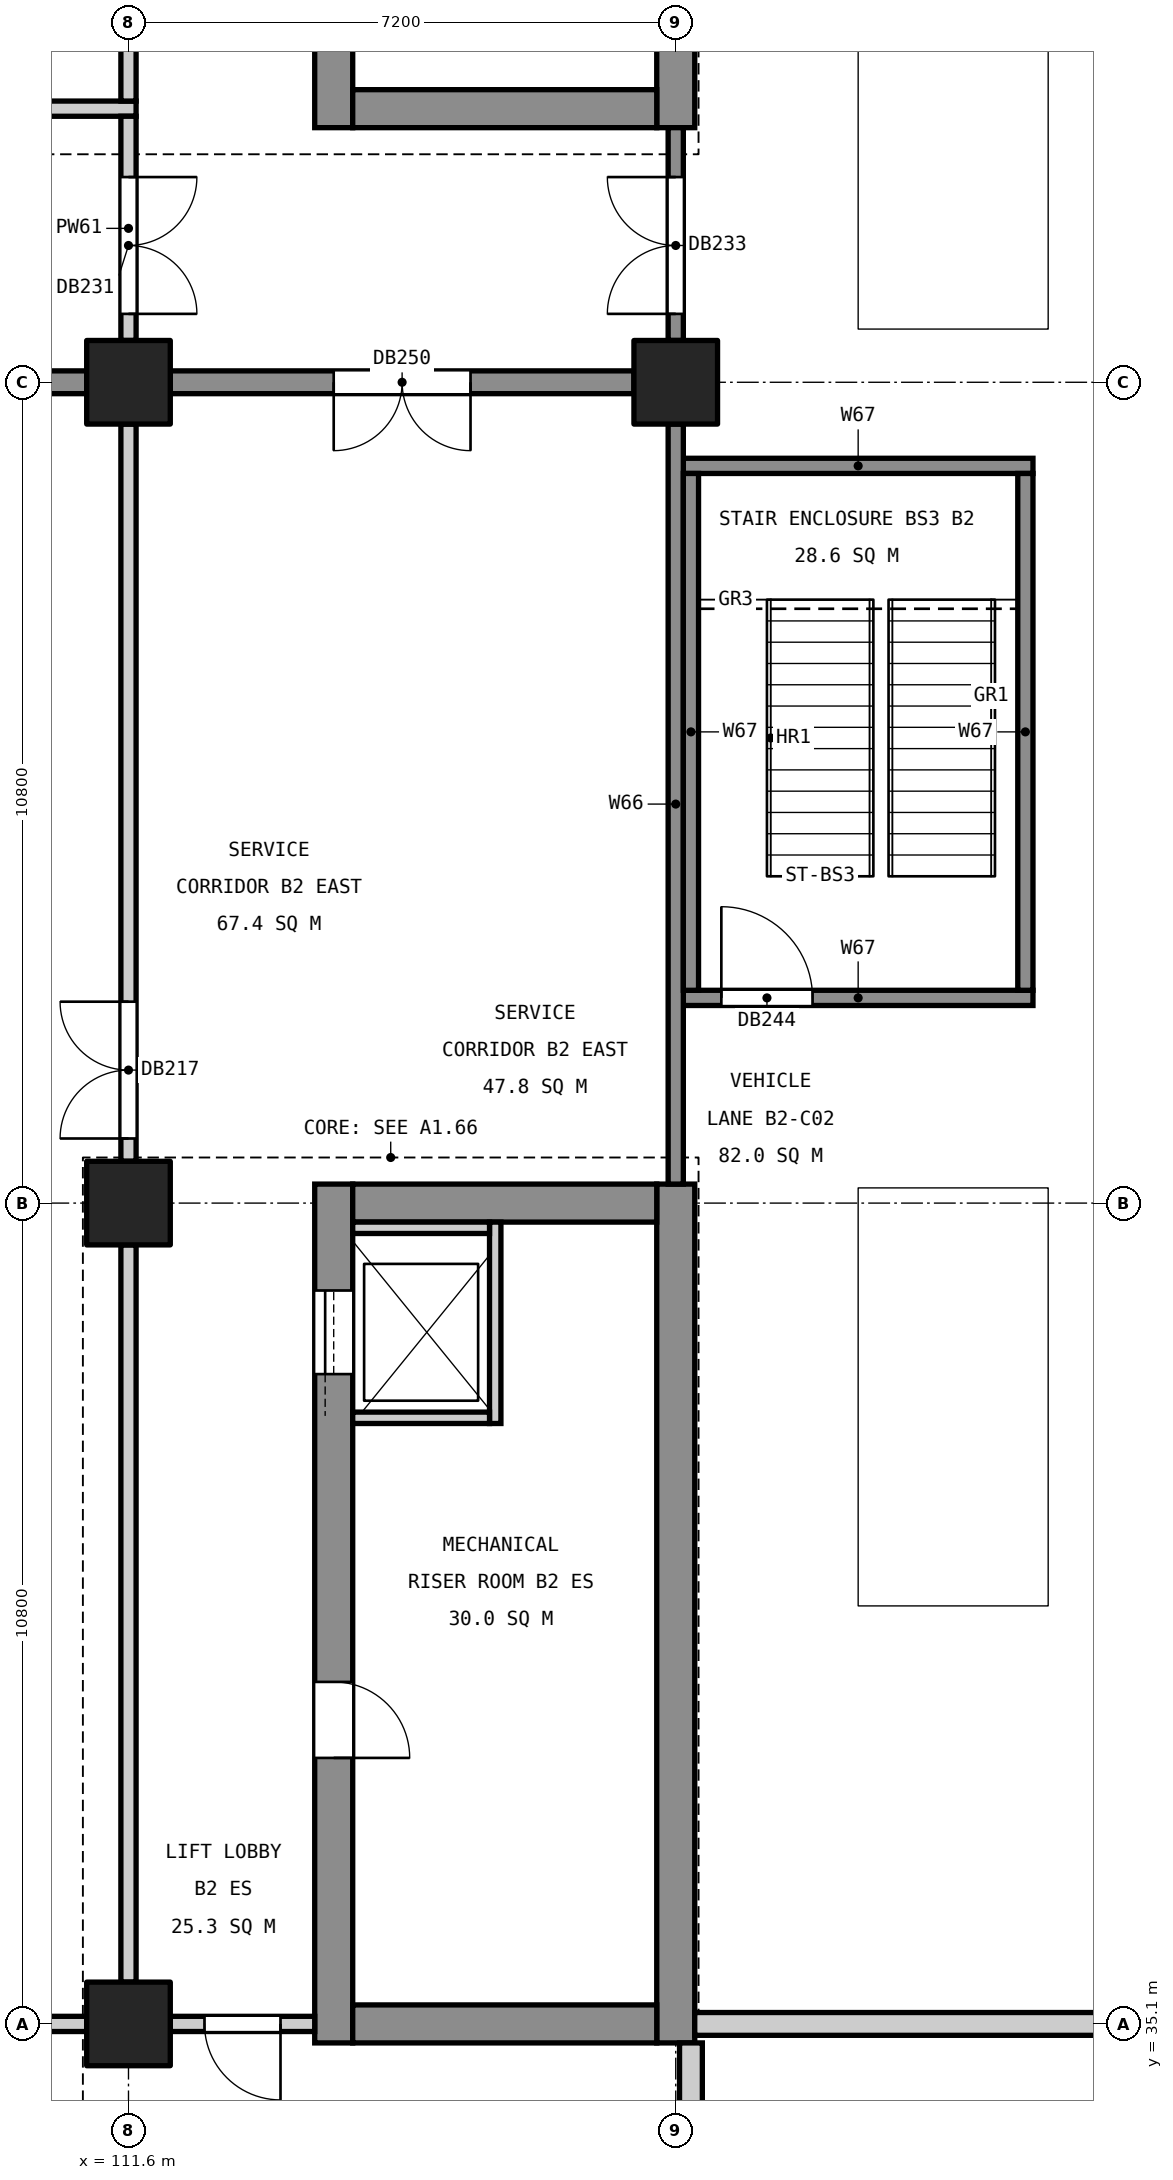
"""IFC4 building model, lengths in metres.
Left out: names, types, materials, properties, quantities, classifications, styles, units other than length and angle.
Written with IfcOpenShell. Run it as: python <this file> out.ifc"""

import sys

from ifc_helpers import new_model, si_unit, direction, frame, frame_2d, origin, origin_2d, place, context, subcontext, project, spatial, rectangle, extrude, element, fill, save


model = new_model("IFC4")
c1 = context("Model", 3, precision=1e-05, world=origin(), true_north=direction((0.0, 1.0)))
c2 = subcontext(c1, "Body", "Model", "MODEL_VIEW")
j1 = project(units=[si_unit("LENGTHUNIT", "METRE"), si_unit("PLANEANGLEUNIT", "RADIAN")], contexts=[c1])
p1 = place(None, origin())
s1 = spatial("IfcSite", under=j1, at=p1, CompositionType="ELEMENT")
p2 = place(p1, origin())
s2 = spatial("IfcBuilding", under=s1, at=p2, CompositionType="ELEMENT")
p3 = place(p2, frame((0.0, 0.0, -9.6)))
s3 = spatial("IfcBuildingStorey", under=s2, at=p3, CompositionType="ELEMENT", Elevation=-9.6)
for number, where, z_axis, x_axis in (
    (1, (118.8, 56.7, 0.0), (0.0, 0.0, 1.0), (1.0, 0.0, 0.0)),
    (2, (111.6, 35.1, 0.0), (0.0, 0.0, 1.0), (1.0, 0.0, 0.0)),
    (3, (111.6, 45.9, 0.0), (0.0, 0.0, 1.0), (1.0, 0.0, 0.0)),
    (4, (111.6, 56.7, 0.0), (0.0, 0.0, 1.0), (1.0, 0.0, 0.0)),
):
    element("IfcColumn", number, at=place(p3, frame(where, z_axis=z_axis, x_axis=x_axis)), inside=s3, PredefinedType="COLUMN", context=c2, shape_type="SweptSolid", body=[
        extrude(rectangle(XDim=1.1, YDim=1.1, at=origin_2d()), origin(), (0.0, 0.0, 1.0), 4.35),
    ])
p4 = place(p3, frame((118.8, 34.85, 0.0), z_axis=(0.0, 0.0, 1.0), x_axis=(0.0, 1.0, 0.0)))
e5 = element("IfcWall", 5, at=p4, inside=s3, PredefinedType="SHEAR", context=c2, shape_type="SweptSolid", body=[
    extrude(rectangle(XDim=11.3, YDim=0.5, at=frame_2d((5.65, 0.0))), origin(), (0.0, 0.0, 1.0), 4.35),
])
p5 = place(p3, frame((114.3, 34.85, 0.0), z_axis=(0.0, 0.0, 1.0), x_axis=(0.0, 1.0, 0.0)))
e6 = element("IfcWall", 6, at=p5, inside=s3, PredefinedType="SHEAR", context=c2, shape_type="SweptSolid", body=[
    extrude(rectangle(XDim=11.3, YDim=0.5, at=frame_2d((5.65, 0.0))), origin(), (0.0, 0.0, 1.0), 4.35),
])
p6 = place(p5, frame((8.8, 0.0, 0.0)))
e7 = element("IfcOpeningElement", 7, at=p6, cuts=e6, PredefinedType="OPENING", context=c2, shape_type="SweptSolid", body=[
    extrude(rectangle(XDim=1.1, YDim=2.1, at=frame_2d((0.55, 1.05))), frame((0.0, 0.26, 0.0), z_axis=(0.0, -1.0, 0.0), x_axis=(1.0, 0.0, 0.0)), (0.0, 0.0, 1.0), 0.52),
])
p7 = place(p5, frame((3.75, 0.0, 0.0)))
e8 = element("IfcOpeningElement", 8, at=p7, cuts=e6, PredefinedType="OPENING", context=c2, shape_type="SweptSolid", body=[
    extrude(rectangle(XDim=1.0, YDim=2.1, at=frame_2d((0.5, 1.05))), frame((0.0, 0.26, 0.0), z_axis=(0.0, -1.0, 0.0), x_axis=(1.0, 0.0, 0.0)), (0.0, 0.0, 1.0), 0.52),
])
for number, where, z_axis, x_axis in (
    (9, (118.55, 35.1, 0.0), (0.0, 0.0, 1.0), (-1.0, 0.0, 0.0)),
    (10, (118.55, 45.9, 0.0), (0.0, 0.0, 1.0), (-1.0, 0.0, 0.0)),
):
    element("IfcWall", number, at=place(p3, frame(where, z_axis=z_axis, x_axis=x_axis)), inside=s3, PredefinedType="SHEAR", context=c2, shape_type="SweptSolid", body=[
        extrude(rectangle(XDim=4.0, YDim=0.5, at=frame_2d((2.0, 0.0))), origin(), (0.0, 0.0, 1.0), 4.35),
    ])
p8 = place(p3, frame((118.8, 60.05, 0.0), z_axis=(0.0, 0.0, 1.0), x_axis=(0.0, 1.0, 0.0)))
e11 = element("IfcWall", 11, at=p8, inside=s3, PredefinedType="SHEAR", context=c2, shape_type="SweptSolid", body=[
    extrude(rectangle(XDim=14.9, YDim=0.5, at=frame_2d((7.45, 0.0))), origin(), (0.0, 0.0, 1.0), 4.35),
])
p9 = place(p3, frame((114.3, 60.05, 0.0), z_axis=(0.0, 0.0, 1.0), x_axis=(0.0, 1.0, 0.0)))
e12 = element("IfcWall", 12, at=p9, inside=s3, PredefinedType="SHEAR", context=c2, shape_type="SweptSolid", body=[
    extrude(rectangle(XDim=14.9, YDim=0.5, at=frame_2d((7.45, 0.0))), origin(), (0.0, 0.0, 1.0), 4.35),
])
p10 = place(p9, frame((8.85, 0.0, 0.0)))
e13 = element("IfcOpeningElement", 13, at=p10, cuts=e12, PredefinedType="OPENING", context=c2, shape_type="SweptSolid", body=[
    extrude(rectangle(XDim=1.1, YDim=2.1, at=frame_2d((0.55, 1.05))), frame((0.0, 0.26, 0.0), z_axis=(0.0, -1.0, 0.0), x_axis=(1.0, 0.0, 0.0)), (0.0, 0.0, 1.0), 0.52),
])
p11 = place(p9, frame((11.4, 0.0, 0.0)))
e14 = element("IfcOpeningElement", 14, at=p11, cuts=e12, PredefinedType="OPENING", context=c2, shape_type="SweptSolid", body=[
    extrude(rectangle(XDim=1.1, YDim=2.1, at=frame_2d((0.55, 1.05))), frame((0.0, 0.26, 0.0), z_axis=(0.0, -1.0, 0.0), x_axis=(1.0, 0.0, 0.0)), (0.0, 0.0, 1.0), 0.52),
])
p12 = place(p9, frame((3.75, 0.0, 0.0)))
e15 = element("IfcOpeningElement", 15, at=p12, cuts=e12, PredefinedType="OPENING", context=c2, shape_type="SweptSolid", body=[
    extrude(rectangle(XDim=1.0, YDim=2.1, at=frame_2d((0.5, 1.05))), frame((0.0, 0.26, 0.0), z_axis=(0.0, -1.0, 0.0), x_axis=(1.0, 0.0, 0.0)), (0.0, 0.0, 1.0), 0.52),
])
p13 = place(p3, frame((118.55, 60.3, 0.0), z_axis=(0.0, 0.0, 1.0), x_axis=(-1.0, 0.0, 0.0)))
e16 = element("IfcWall", 16, at=p13, inside=s3, PredefinedType="SHEAR", context=c2, shape_type="SweptSolid", body=[
    extrude(rectangle(XDim=4.0, YDim=0.5, at=frame_2d((2.0, 0.0))), origin(), (0.0, 0.0, 1.0), 4.35),
])
p14 = place(p3, frame((118.25, 56.7, 0.0), z_axis=(0.0, 0.0, 1.0), x_axis=(-1.0, 0.0, 0.0)))
e17 = element("IfcWall", 17, at=p14, inside=s3, PredefinedType="SHEAR", context=c2, shape_type="SweptSolid", body=[
    extrude(rectangle(XDim=6.1, YDim=0.3, at=frame_2d((3.05, 0.0))), origin(), (0.0, 0.0, 1.0), 4.35),
])
p15 = place(p14, frame((2.15, 0.0, 0.0)))
e18 = element("IfcOpeningElement", 18, at=p15, cuts=e17, PredefinedType="OPENING", context=c2, shape_type="SweptSolid", body=[
    extrude(rectangle(XDim=1.8, YDim=2.1, at=frame_2d((0.9, 1.05))), frame((0.0, 0.16, 0.0), z_axis=(0.0, -1.0, 0.0), x_axis=(1.0, 0.0, 0.0)), (0.0, 0.0, 1.0), 0.32),
])
p16 = place(p3, frame((111.05, 56.7, 0.0), z_axis=(0.0, 0.0, 1.0), x_axis=(-1.0, 0.0, 0.0)))
e19 = element("IfcWall", 19, at=p16, inside=s3, PredefinedType="SHEAR", context=c2, shape_type="SweptSolid", body=[
    extrude(rectangle(XDim=9.7, YDim=0.3, at=frame_2d((4.85, 0.0))), origin(), (0.0, 0.0, 1.0), 4.35),
])
p17 = place(p3, frame((116.425, 43.0, 0.0), z_axis=(0.0, 0.0, 1.0), x_axis=(0.0, 1.0, 0.0)))
e20 = element("IfcWall", 20, at=p17, inside=s3, PredefinedType="SOLIDWALL", context=c2, shape_type="SweptSolid", body=[
    extrude(rectangle(XDim=2.65, YDim=0.15, at=frame_2d((1.325, 0.0))), origin(), (0.0, 0.0, 1.0), 4.8),
])
for number, where, z_axis, x_axis in (
    (21, (116.35, 43.075, 0.0), (0.0, 0.0, 1.0), (-1.0, 0.0, 0.0)),
    (22, (116.35, 45.575, 0.0), (0.0, 0.0, 1.0), (-1.0, 0.0, 0.0)),
):
    element("IfcWall", number, at=place(p3, frame(where, z_axis=z_axis, x_axis=x_axis)), inside=s3, PredefinedType="SOLIDWALL", context=c2, shape_type="SweptSolid", body=[
        extrude(rectangle(XDim=1.8, YDim=0.15, at=frame_2d((0.9, 0.0))), origin(), (0.0, 0.0, 1.0), 4.8),
    ])
p18 = place(p3, frame((101.35, 35.1, 0.0), z_axis=(0.0, 0.0, 1.0), x_axis=(1.0, 0.0, 0.0)))
e23 = element("IfcWall", 23, at=p18, inside=s3, PredefinedType="PARTITIONING", context=c2, shape_type="SweptSolid", body=[
    extrude(rectangle(XDim=9.7, YDim=0.2, at=frame_2d((4.85, 0.0))), origin(), (0.0, 0.0, 1.0), 4.35),
])
p19 = place(p3, frame((112.15, 35.1, 0.0), z_axis=(0.0, 0.0, 1.0), x_axis=(1.0, 0.0, 0.0)))
e24 = element("IfcWall", 24, at=p19, inside=s3, PredefinedType="PARTITIONING", context=c2, shape_type="SweptSolid", body=[
    extrude(rectangle(XDim=1.9, YDim=0.2, at=frame_2d((0.95, 0.0))), origin(), (0.0, 0.0, 1.0), 4.35),
])
p20 = place(p19, frame((0.45, 0.0, 0.0)))
e25 = element("IfcOpeningElement", 25, at=p20, cuts=e24, PredefinedType="OPENING", context=c2, shape_type="SweptSolid", body=[
    extrude(rectangle(XDim=1.0, YDim=2.1, at=frame_2d((0.5, 1.05))), frame((0.0, 0.11, 0.0), z_axis=(0.0, -1.0, 0.0), x_axis=(1.0, 0.0, 0.0)), (0.0, 0.0, 1.0), 0.22),
])
p21 = place(p3, frame((119.05, 35.1, 0.0), z_axis=(0.0, 0.0, 1.0), x_axis=(1.0, 0.0, 0.0)))
e26 = element("IfcWall", 26, at=p21, inside=s3, PredefinedType="SOLIDWALL", context=c2, shape_type="SweptSolid", body=[
    extrude(rectangle(XDim=6.425, YDim=0.3, at=frame_2d((3.212, 0.0))), origin(), (0.0, 0.0, 1.0), 4.35),
])
p22 = place(p3, frame((118.9, 48.6, 0.0), z_axis=(0.0, 0.0, 1.0), x_axis=(1.0, 0.0, 0.0)))
e27 = element("IfcWall", 27, at=p22, inside=s3, PredefinedType="SOLIDWALL", context=c2, shape_type="SweptSolid", body=[
    extrude(rectangle(XDim=4.6, YDim=0.2, at=frame_2d((2.3, 0.0))), origin(), (0.0, 0.0, 1.0), 4.35),
])
p23 = place(p22, frame((0.5, 0.0, 0.0)))
e28 = element("IfcOpeningElement", 28, at=p23, cuts=e27, PredefinedType="OPENING", context=c2, shape_type="SweptSolid", body=[
    extrude(rectangle(XDim=1.2, YDim=2.1, at=frame_2d((0.6, 1.05))), frame((0.0, 0.11, 0.0), z_axis=(0.0, -1.0, 0.0), x_axis=(1.0, 0.0, 0.0)), (0.0, 0.0, 1.0), 0.22),
])
p24 = place(p3, frame((118.9, 55.6, 0.0), z_axis=(0.0, 0.0, 1.0), x_axis=(1.0, 0.0, 0.0)))
e29 = element("IfcWall", 29, at=p24, inside=s3, PredefinedType="SOLIDWALL", context=c2, shape_type="SweptSolid", body=[
    extrude(rectangle(XDim=4.6, YDim=0.2, at=frame_2d((2.3, 0.0))), origin(), (0.0, 0.0, 1.0), 4.35),
])
p25 = place(p3, frame((100.9, 60.3, 0.0), z_axis=(0.0, 0.0, 1.0), x_axis=(1.0, 0.0, 0.0)))
e30 = element("IfcWall", 30, at=p25, inside=s3, PredefinedType="PARTITIONING", context=c2, shape_type="SweptSolid", body=[
    extrude(rectangle(XDim=10.8, YDim=0.2, at=frame_2d((5.4, 0.0))), origin(), (0.0, 0.0, 1.0), 4.35),
])
p26 = place(p3, frame((111.6, 35.65, 0.0), z_axis=(0.0, 0.0, 1.0), x_axis=(0.0, 1.0, 0.0)))
e31 = element("IfcWall", 31, at=p26, inside=s3, PredefinedType="PARTITIONING", context=c2, shape_type="SweptSolid", body=[
    extrude(rectangle(XDim=9.7, YDim=0.2, at=frame_2d((4.85, 0.0))), origin(), (0.0, 0.0, 1.0), 4.35),
])
p27 = place(p3, frame((111.6, 46.45, 0.0), z_axis=(0.0, 0.0, 1.0), x_axis=(0.0, 1.0, 0.0)))
e32 = element("IfcWall", 32, at=p27, inside=s3, PredefinedType="PARTITIONING", context=c2, shape_type="SweptSolid", body=[
    extrude(rectangle(XDim=9.7, YDim=0.2, at=frame_2d((4.85, 0.0))), origin(), (0.0, 0.0, 1.0), 4.35),
])
p28 = place(p27, frame((0.3, 0.0, 0.0)))
e33 = element("IfcOpeningElement", 33, at=p28, cuts=e32, PredefinedType="OPENING", context=c2, shape_type="SweptSolid", body=[
    extrude(rectangle(XDim=1.8, YDim=2.1, at=frame_2d((0.9, 1.05))), frame((0.0, 0.11, 0.0), z_axis=(0.0, -1.0, 0.0), x_axis=(1.0, 0.0, 0.0)), (0.0, 0.0, 1.0), 0.22),
])
p29 = place(p3, frame((111.6, 57.25, 0.0), z_axis=(0.0, 0.0, 1.0), x_axis=(0.0, 1.0, 0.0)))
e34 = element("IfcWall", 34, at=p29, inside=s3, PredefinedType="PARTITIONING", context=c2, shape_type="SweptSolid", body=[
    extrude(rectangle(XDim=2.95, YDim=0.2, at=frame_2d((1.475, 0.0))), origin(), (0.0, 0.0, 1.0), 4.35),
])
p30 = place(p29, frame((0.35, 0.0, 0.0)))
e35 = element("IfcOpeningElement", 35, at=p30, cuts=e34, PredefinedType="OPENING", context=c2, shape_type="SweptSolid", body=[
    extrude(rectangle(XDim=1.8, YDim=2.1, at=frame_2d((0.9, 1.05))), frame((0.0, 0.11, 0.0), z_axis=(0.0, -1.0, 0.0), x_axis=(1.0, 0.0, 0.0)), (0.0, 0.0, 1.0), 0.22),
])
p31 = place(p3, frame((111.6, 60.4, 0.0), z_axis=(0.0, 0.0, 1.0), x_axis=(0.0, 1.0, 0.0)))
e36 = element("IfcWall", 36, at=p31, inside=s3, PredefinedType="PARTITIONING", context=c2, shape_type="SweptSolid", body=[
    extrude(rectangle(XDim=6.55, YDim=0.2, at=frame_2d((3.275, 0.0))), origin(), (0.0, 0.0, 1.0), 4.35),
])
p32 = place(p3, frame((118.8, 46.15, 0.0), z_axis=(0.0, 0.0, 1.0), x_axis=(0.0, 1.0, 0.0)))
e37 = element("IfcWall", 37, at=p32, inside=s3, PredefinedType="SOLIDWALL", context=c2, shape_type="SweptSolid", body=[
    extrude(rectangle(XDim=10.0, YDim=0.2, at=frame_2d((5.0, 0.0))), origin(), (0.0, 0.0, 1.0), 4.35),
])
p33 = place(p3, frame((118.8, 57.25, 0.0), z_axis=(0.0, 0.0, 1.0), x_axis=(0.0, 1.0, 0.0)))
e38 = element("IfcWall", 38, at=p33, inside=s3, PredefinedType="SOLIDWALL", context=c2, shape_type="SweptSolid", body=[
    extrude(rectangle(XDim=2.8, YDim=0.2, at=frame_2d((1.4, 0.0))), origin(), (0.0, 0.0, 1.0), 4.35),
])
p34 = place(p33, frame((0.35, 0.0, 0.0)))
e39 = element("IfcOpeningElement", 39, at=p34, cuts=e38, PredefinedType="OPENING", context=c2, shape_type="SweptSolid", body=[
    extrude(rectangle(XDim=1.8, YDim=2.1, at=frame_2d((0.9, 1.05))), frame((0.0, 0.11, 0.0), z_axis=(0.0, -1.0, 0.0), x_axis=(1.0, 0.0, 0.0)), (0.0, 0.0, 1.0), 0.22),
])
p35 = place(p3, frame((119.0, 27.7, 0.0), z_axis=(0.0, 0.0, 1.0), x_axis=(0.0, 1.0, 0.0)))
e40 = element("IfcWall", 40, at=p35, inside=s3, PredefinedType="SOLIDWALL", context=c2, shape_type="SweptSolid", body=[
    extrude(rectangle(XDim=7.15, YDim=0.3, at=frame_2d((3.575, 0.0))), origin(), (0.0, 0.0, 1.0), 4.35),
])
for number, where, z_axis, x_axis in (
    (41, (119.0, 48.7, 0.0), (0.0, 0.0, 1.0), (0.0, 1.0, 0.0)),
    (42, (123.4, 48.7, 0.0), (0.0, 0.0, 1.0), (0.0, 1.0, 0.0)),
):
    element("IfcWall", number, at=place(p3, frame(where, z_axis=z_axis, x_axis=x_axis)), inside=s3, PredefinedType="SOLIDWALL", context=c2, shape_type="SweptSolid", body=[
        extrude(rectangle(XDim=6.8, YDim=0.2, at=frame_2d((3.4, 0.0))), origin(), (0.0, 0.0, 1.0), 4.35),
    ])
p36 = place(p6, origin())
e43 = element("IfcDoor", 43, at=p36, inside=s3, OperationType="SLIDING_TO_LEFT", PredefinedType="DOOR", context=c2, shape_type="SweptSolid", body=[
    extrude(rectangle(XDim=1.1, YDim=2.1, at=frame_2d((0.55, 1.05))), frame((0.0, 0.025, 0.0), z_axis=(0.0, -1.0, 0.0), x_axis=(1.0, 0.0, 0.0)), (0.0, 0.0, 1.0), 0.05),
])
fill(e7, e43)
p37 = place(p28, origin())
e44 = element("IfcDoor", 44, at=p37, inside=s3, OperationType="DOUBLE_DOOR_SINGLE_SWING", PredefinedType="DOOR", context=c2, shape_type="SweptSolid", body=[
    extrude(rectangle(XDim=1.8, YDim=2.1, at=frame_2d((0.9, 1.05))), frame((0.0, 0.025, 0.0), z_axis=(0.0, -1.0, 0.0), x_axis=(1.0, 0.0, 0.0)), (0.0, 0.0, 1.0), 0.05),
])
fill(e33, e44)
p38 = place(p20, frame((1.0, 0.0, 0.0), z_axis=(0.0, 0.0, 1.0), x_axis=(-1.0, 0.0, 0.0)))
e45 = element("IfcDoor", 45, at=p38, inside=s3, OperationType="SINGLE_SWING_LEFT", PredefinedType="DOOR", context=c2, shape_type="SweptSolid", body=[
    extrude(rectangle(XDim=1.0, YDim=2.1, at=frame_2d((0.5, 1.05))), frame((0.0, 0.025, 0.0), z_axis=(0.0, -1.0, 0.0), x_axis=(1.0, 0.0, 0.0)), (0.0, 0.0, 1.0), 0.05),
])
fill(e25, e45)
p39 = place(p30, frame((1.8, 0.0, 0.0), z_axis=(0.0, 0.0, 1.0), x_axis=(-1.0, 0.0, 0.0)))
e46 = element("IfcDoor", 46, at=p39, inside=s3, OperationType="DOUBLE_DOOR_SINGLE_SWING", PredefinedType="DOOR", context=c2, shape_type="SweptSolid", body=[
    extrude(rectangle(XDim=1.8, YDim=2.1, at=frame_2d((0.9, 1.05))), frame((0.0, 0.025, 0.0), z_axis=(0.0, -1.0, 0.0), x_axis=(1.0, 0.0, 0.0)), (0.0, 0.0, 1.0), 0.05),
])
fill(e35, e46)
p40 = place(p34, origin())
e47 = element("IfcDoor", 47, at=p40, inside=s3, OperationType="DOUBLE_DOOR_SINGLE_SWING", PredefinedType="DOOR", context=c2, shape_type="SweptSolid", body=[
    extrude(rectangle(XDim=1.8, YDim=2.1, at=frame_2d((0.9, 1.05))), frame((0.0, 0.025, 0.0), z_axis=(0.0, -1.0, 0.0), x_axis=(1.0, 0.0, 0.0)), (0.0, 0.0, 1.0), 0.05),
])
fill(e39, e47)
p41 = place(p7, frame((1.0, 0.0, 0.0), z_axis=(0.0, 0.0, 1.0), x_axis=(-1.0, 0.0, 0.0)))
e48 = element("IfcDoor", 48, at=p41, inside=s3, OperationType="SINGLE_SWING_RIGHT", PredefinedType="DOOR", context=c2, shape_type="SweptSolid", body=[
    extrude(rectangle(XDim=1.0, YDim=2.1, at=frame_2d((0.5, 1.05))), frame((0.0, 0.025, 0.0), z_axis=(0.0, -1.0, 0.0), x_axis=(1.0, 0.0, 0.0)), (0.0, 0.0, 1.0), 0.05),
])
fill(e8, e48)
p42 = place(p23, origin())
e49 = element("IfcDoor", 49, at=p42, inside=s3, OperationType="SINGLE_SWING_LEFT", PredefinedType="DOOR", context=c2, shape_type="SweptSolid", body=[
    extrude(rectangle(XDim=1.2, YDim=2.1, at=frame_2d((0.6, 1.05))), frame((0.0, 0.025, 0.0), z_axis=(0.0, -1.0, 0.0), x_axis=(1.0, 0.0, 0.0)), (0.0, 0.0, 1.0), 0.05),
])
fill(e28, e49)
p43 = place(p15, origin())
e50 = element("IfcDoor", 50, at=p43, inside=s3, OperationType="DOUBLE_DOOR_SINGLE_SWING", PredefinedType="DOOR", context=c2, shape_type="SweptSolid", body=[
    extrude(rectangle(XDim=1.8, YDim=2.1, at=frame_2d((0.9, 1.05))), frame((0.0, 0.025, 0.0), z_axis=(0.0, -1.0, 0.0), x_axis=(1.0, 0.0, 0.0)), (0.0, 0.0, 1.0), 0.05),
])
fill(e18, e50)
save(model, sys.argv[1])
